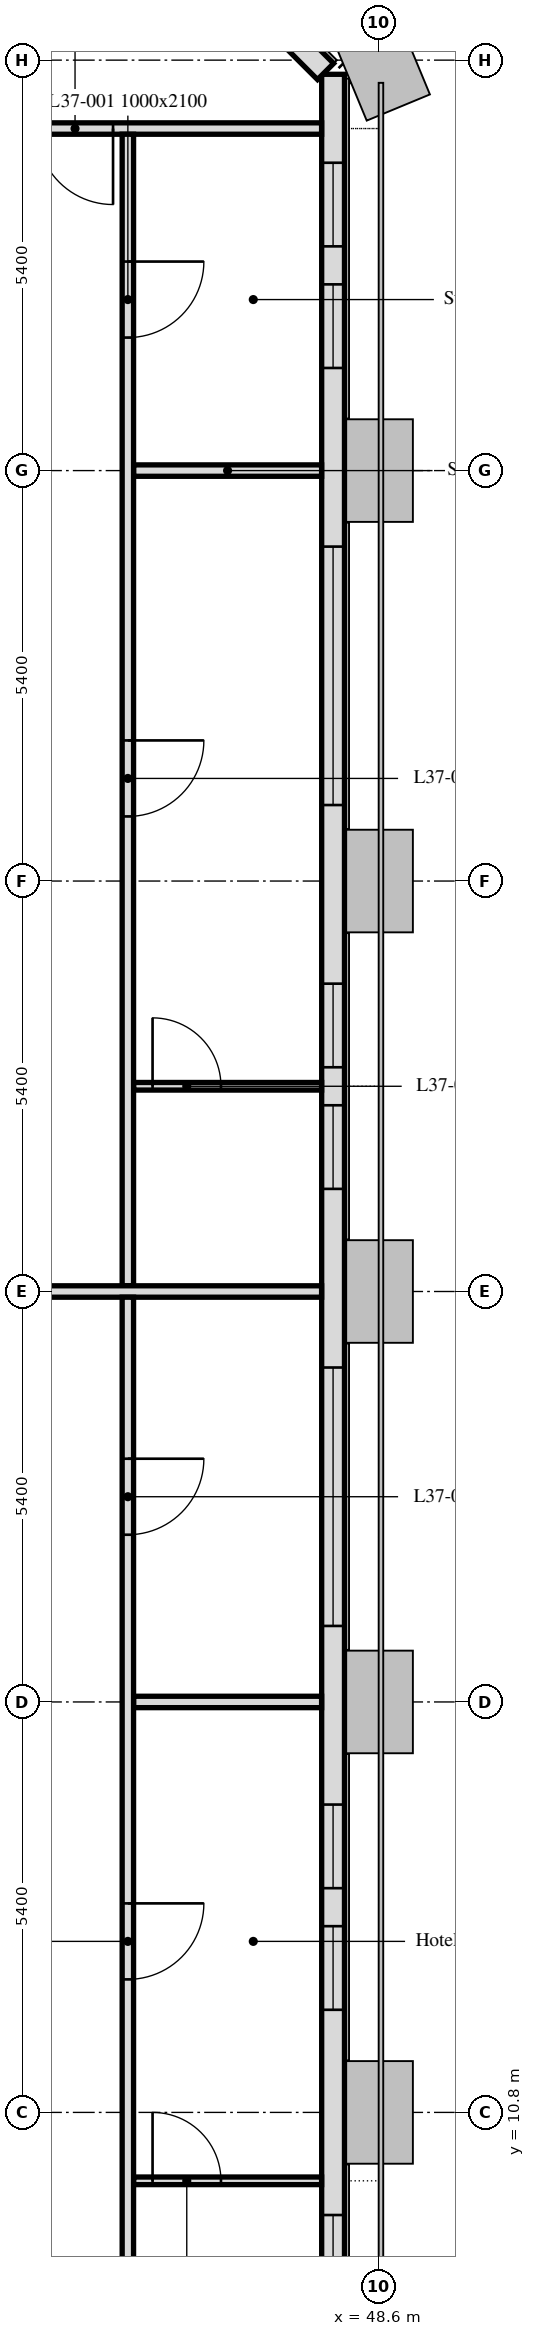
"""IFC4 building model, lengths in metres.
Left out: names, types, materials, properties, quantities, classifications, styles, units other than length and angle.
Written with IfcOpenShell. Run it as: python <this file> out.ifc"""

import sys

from ifc_helpers import new_model, si_unit, direction, frame, frame_2d, origin, place, context, subcontext, project, spatial, rectangle, extrude, element, fill, save


model = new_model("IFC4")
c1 = context("Model", 3, precision=1e-05, world=origin(), true_north=direction((0.0, 1.0)))
c2 = subcontext(c1, "Body", "Model", "MODEL_VIEW")
j1 = project(units=[si_unit("LENGTHUNIT", "METRE"), si_unit("PLANEANGLEUNIT", "RADIAN")], contexts=[c1])
p1 = place(None, origin())
s1 = spatial("IfcSite", under=j1, at=p1, CompositionType="ELEMENT")
p2 = place(p1, origin())
s2 = spatial("IfcBuilding", under=s1, at=p2, CompositionType="ELEMENT")
p3 = place(p2, frame((0.0, 0.0, 159.4)))
s3 = spatial("IfcBuildingStorey", under=s2, at=p3, CompositionType="ELEMENT", Elevation=159.4)
p4 = place(p3, frame((48.0, 5.586, 0.0), z_axis=(0.0, 0.0, 1.0), x_axis=(0.0, 1.0, 0.0)))
e1 = element("IfcWall", 1, at=p4, inside=s3, PredefinedType="SOLIDWALL", context=c2, shape_type="SweptSolid", body=[
    extrude(rectangle(XDim=32.027, YDim=0.3, at=frame_2d((16.014, 0.0))), origin(), (0.0, 0.0, 1.0), 3.0),
])
p5 = place(p4, frame((1.789, 0.0, 0.9)))
e2 = element("IfcOpeningElement", 2, at=p5, cuts=e1, PredefinedType="OPENING", context=c2, shape_type="SweptSolid", body=[
    extrude(rectangle(XDim=0.65, YDim=1.7, at=frame_2d((0.325, 0.85))), frame((0.0, 0.16, 0.0), z_axis=(0.0, -1.0, 0.0), x_axis=(1.0, 0.0, 0.0)), (0.0, 0.0, 1.0), 0.32),
])
p6 = place(p4, frame((2.764, 0.0, 0.9)))
e3 = element("IfcOpeningElement", 3, at=p6, cuts=e1, PredefinedType="OPENING", context=c2, shape_type="SweptSolid", body=[
    extrude(rectangle(XDim=1.1, YDim=1.7, at=frame_2d((0.55, 0.85))), frame((0.0, 0.16, 0.0), z_axis=(0.0, -1.0, 0.0), x_axis=(1.0, 0.0, 0.0)), (0.0, 0.0, 1.0), 0.32),
])
p7 = place(p4, frame((6.564, 0.0, 0.9)))
e4 = element("IfcOpeningElement", 4, at=p7, cuts=e1, PredefinedType="OPENING", context=c2, shape_type="SweptSolid", body=[
    extrude(rectangle(XDim=1.1, YDim=1.7, at=frame_2d((0.55, 0.85))), frame((0.0, 0.16, 0.0), z_axis=(0.0, -1.0, 0.0), x_axis=(1.0, 0.0, 0.0)), (0.0, 0.0, 1.0), 0.32),
])
p8 = place(p4, frame((8.164, 0.0, 0.9)))
e5 = element("IfcOpeningElement", 5, at=p8, cuts=e1, PredefinedType="OPENING", context=c2, shape_type="SweptSolid", body=[
    extrude(rectangle(XDim=1.1, YDim=1.7, at=frame_2d((0.55, 0.85))), frame((0.0, 0.16, 0.0), z_axis=(0.0, -1.0, 0.0), x_axis=(1.0, 0.0, 0.0)), (0.0, 0.0, 1.0), 0.32),
])
p9 = place(p4, frame((11.614, 0.0, 0.9)))
e6 = element("IfcOpeningElement", 6, at=p9, cuts=e1, PredefinedType="OPENING", context=c2, shape_type="SweptSolid", body=[
    extrude(rectangle(XDim=3.4, YDim=1.7, at=frame_2d((1.7, 0.85))), frame((0.0, 0.16, 0.0), z_axis=(0.0, -1.0, 0.0), x_axis=(1.0, 0.0, 0.0)), (0.0, 0.0, 1.0), 0.32),
])
p10 = place(p4, frame((17.364, 0.0, 0.9)))
e7 = element("IfcOpeningElement", 7, at=p10, cuts=e1, PredefinedType="OPENING", context=c2, shape_type="SweptSolid", body=[
    extrude(rectangle(XDim=1.1, YDim=1.7, at=frame_2d((0.55, 0.85))), frame((0.0, 0.16, 0.0), z_axis=(0.0, -1.0, 0.0), x_axis=(1.0, 0.0, 0.0)), (0.0, 0.0, 1.0), 0.32),
])
p11 = place(p4, frame((18.964, 0.0, 0.9)))
e8 = element("IfcOpeningElement", 8, at=p11, cuts=e1, PredefinedType="OPENING", context=c2, shape_type="SweptSolid", body=[
    extrude(rectangle(XDim=1.1, YDim=1.7, at=frame_2d((0.55, 0.85))), frame((0.0, 0.16, 0.0), z_axis=(0.0, -1.0, 0.0), x_axis=(1.0, 0.0, 0.0)), (0.0, 0.0, 1.0), 0.32),
])
p12 = place(p4, frame((22.414, 0.0, 0.9)))
e9 = element("IfcOpeningElement", 9, at=p12, cuts=e1, PredefinedType="OPENING", context=c2, shape_type="SweptSolid", body=[
    extrude(rectangle(XDim=3.4, YDim=1.7, at=frame_2d((1.7, 0.85))), frame((0.0, 0.16, 0.0), z_axis=(0.0, -1.0, 0.0), x_axis=(1.0, 0.0, 0.0)), (0.0, 0.0, 1.0), 0.32),
])
p13 = place(p4, frame((28.164, 0.0, 0.9)))
e10 = element("IfcOpeningElement", 10, at=p13, cuts=e1, PredefinedType="OPENING", context=c2, shape_type="SweptSolid", body=[
    extrude(rectangle(XDim=1.1, YDim=1.7, at=frame_2d((0.55, 0.85))), frame((0.0, 0.16, 0.0), z_axis=(0.0, -1.0, 0.0), x_axis=(1.0, 0.0, 0.0)), (0.0, 0.0, 1.0), 0.32),
])
p14 = place(p4, frame((29.764, 0.0, 0.9)))
e11 = element("IfcOpeningElement", 11, at=p14, cuts=e1, PredefinedType="OPENING", context=c2, shape_type="SweptSolid", body=[
    extrude(rectangle(XDim=1.1, YDim=1.7, at=frame_2d((0.55, 0.85))), frame((0.0, 0.16, 0.0), z_axis=(0.0, -1.0, 0.0), x_axis=(1.0, 0.0, 0.0)), (0.0, 0.0, 1.0), 0.32),
])
p15 = place(p3, frame((47.901, 37.65, 0.0), z_axis=(0.0, 0.0, 1.0), x_axis=(-0.707106781187, 0.707106781187, 0.0)))
e12 = element("IfcWall", 12, at=p15, inside=s3, PredefinedType="SOLIDWALL", context=c2, shape_type="SweptSolid", body=[
    extrude(rectangle(XDim=6.86, YDim=0.3, at=frame_2d((3.43, 0.0))), origin(), (0.0, 0.0, 1.0), 3.0),
])
p16 = place(p15, frame((1.73, 0.0, 0.9)))
e13 = element("IfcOpeningElement", 13, at=p16, cuts=e12, PredefinedType="OPENING", context=c2, shape_type="SweptSolid", body=[
    extrude(rectangle(XDim=3.4, YDim=1.7, at=frame_2d((1.7, 0.85))), frame((0.0, 0.16, 0.0), z_axis=(0.0, -1.0, 0.0), x_axis=(1.0, 0.0, 0.0)), (0.0, 0.0, 1.0), 0.32),
])
p17 = place(p3, frame((45.375, 32.4, 0.0), z_axis=(0.0, 0.0, 1.0), x_axis=(1.0, 0.0, 0.0)))
e14 = element("IfcWall", 14, at=p17, inside=s3, PredefinedType="PARTITIONING", context=c2, shape_type="SweptSolid", body=[
    extrude(rectangle(XDim=2.474, YDim=0.15, at=frame_2d((1.237, 0.0))), origin(), (0.0, 0.0, 1.0), 2.4),
])
p18 = place(p3, frame((47.849, 36.9, 0.0), z_axis=(0.0, 0.0, 1.0), x_axis=(-1.0, 0.0, 0.0)))
e15 = element("IfcWall", 15, at=p18, inside=s3, PredefinedType="PARTITIONING", context=c2, shape_type="SweptSolid", body=[
    extrude(rectangle(XDim=41.698, YDim=0.15, at=frame_2d((20.849, 0.0))), origin(), (0.0, 0.0, 1.0), 3.0),
])
p19 = place(p18, frame((39.249, 0.0, 0.0)))
e16 = element("IfcOpeningElement", 16, at=p19, cuts=e15, PredefinedType="OPENING", context=c2, shape_type="SweptSolid", body=[
    extrude(rectangle(XDim=1.0, YDim=2.1, at=frame_2d((0.5, 1.05))), frame((0.0, 0.075, 0.0), z_axis=(0.0, -1.0, 0.0), x_axis=(1.0, 0.0, 0.0)), (0.0, 0.0, 1.0), 0.15),
])
p20 = place(p18, frame((27.649, 0.0, 0.0)))
e17 = element("IfcOpeningElement", 17, at=p20, cuts=e15, PredefinedType="OPENING", context=c2, shape_type="SweptSolid", body=[
    extrude(rectangle(XDim=1.0, YDim=2.1, at=frame_2d((0.5, 1.05))), frame((0.0, 0.075, 0.0), z_axis=(0.0, -1.0, 0.0), x_axis=(1.0, 0.0, 0.0)), (0.0, 0.0, 1.0), 0.15),
])
p21 = place(p18, frame((22.249, 0.0, 0.0)))
e18 = element("IfcOpeningElement", 18, at=p21, cuts=e15, PredefinedType="OPENING", context=c2, shape_type="SweptSolid", body=[
    extrude(rectangle(XDim=1.0, YDim=2.1, at=frame_2d((0.5, 1.05))), frame((0.0, 0.075, 0.0), z_axis=(0.0, -1.0, 0.0), x_axis=(1.0, 0.0, 0.0)), (0.0, 0.0, 1.0), 0.15),
])
p22 = place(p18, frame((16.849, 0.0, 0.0)))
e19 = element("IfcOpeningElement", 19, at=p22, cuts=e15, PredefinedType="OPENING", context=c2, shape_type="SweptSolid", body=[
    extrude(rectangle(XDim=1.0, YDim=2.1, at=frame_2d((0.5, 1.05))), frame((0.0, 0.075, 0.0), z_axis=(0.0, -1.0, 0.0), x_axis=(1.0, 0.0, 0.0)), (0.0, 0.0, 1.0), 0.15),
])
p23 = place(p18, frame((11.449, 0.0, 0.0)))
e20 = element("IfcOpeningElement", 20, at=p23, cuts=e15, PredefinedType="OPENING", context=c2, shape_type="SweptSolid", body=[
    extrude(rectangle(XDim=1.0, YDim=2.1, at=frame_2d((0.5, 1.05))), frame((0.0, 0.075, 0.0), z_axis=(0.0, -1.0, 0.0), x_axis=(1.0, 0.0, 0.0)), (0.0, 0.0, 1.0), 0.15),
])
p24 = place(p18, frame((2.744, 0.0, 0.0)))
e21 = element("IfcOpeningElement", 21, at=p24, cuts=e15, PredefinedType="OPENING", context=c2, shape_type="SweptSolid", body=[
    extrude(rectangle(XDim=1.0, YDim=2.1, at=frame_2d((0.5, 1.05))), frame((0.0, 0.075, 0.0), z_axis=(0.0, -1.0, 0.0), x_axis=(1.0, 0.0, 0.0)), (0.0, 0.0, 1.0), 0.15),
])
p25 = place(p3, frame((45.375, 24.3, 0.0), z_axis=(0.0, 0.0, 1.0), x_axis=(1.0, 0.0, 0.0)))
e22 = element("IfcWall", 22, at=p25, inside=s3, PredefinedType="PARTITIONING", context=c2, shape_type="SweptSolid", body=[
    extrude(rectangle(XDim=2.474, YDim=0.1, at=frame_2d((1.237, 0.0))), origin(), (0.0, 0.0, 1.0), 3.0),
])
p26 = place(p25, frame((0.25, 0.0, 0.0)))
e23 = element("IfcOpeningElement", 23, at=p26, cuts=e22, PredefinedType="OPENING", context=c2, shape_type="SweptSolid", body=[
    extrude(rectangle(XDim=0.9, YDim=2.1, at=frame_2d((0.45, 1.05))), frame((0.0, 0.05, 0.0), z_axis=(0.0, -1.0, 0.0), x_axis=(1.0, 0.0, 0.0)), (0.0, 0.0, 1.0), 0.1),
])
p27 = place(p3, frame((45.3, 36.825, 0.0), z_axis=(0.0, 0.0, 1.0), x_axis=(0.0, -1.0, 0.0)))
e24 = element("IfcWall", 24, at=p27, inside=s3, PredefinedType="PARTITIONING", context=c2, shape_type="SweptSolid", body=[
    extrude(rectangle(XDim=15.15, YDim=0.15, at=frame_2d((7.575, 0.0))), origin(), (0.0, 0.0, 1.0), 2.4),
])
p28 = place(p27, frame((1.675, 0.0, 0.0)))
e25 = element("IfcOpeningElement", 25, at=p28, cuts=e24, PredefinedType="OPENING", context=c2, shape_type="SweptSolid", body=[
    extrude(rectangle(XDim=1.0, YDim=2.1, at=frame_2d((0.5, 1.05))), frame((0.0, 0.075, 0.0), z_axis=(0.0, -1.0, 0.0), x_axis=(1.0, 0.0, 0.0)), (0.0, 0.0, 1.0), 0.15),
])
p29 = place(p27, frame((7.975, 0.0, 0.0)))
e26 = element("IfcOpeningElement", 26, at=p29, cuts=e24, PredefinedType="OPENING", context=c2, shape_type="SweptSolid", body=[
    extrude(rectangle(XDim=1.0, YDim=2.1, at=frame_2d((0.5, 1.05))), frame((0.0, 0.075, 0.0), z_axis=(0.0, -1.0, 0.0), x_axis=(1.0, 0.0, 0.0)), (0.0, 0.0, 1.0), 0.15),
])
p30 = place(p3, frame((43.2, 21.6, 0.0), z_axis=(0.0, 0.0, 1.0), x_axis=(1.0, 0.0, 0.0)))
e27 = element("IfcWall", 27, at=p30, inside=s3, PredefinedType="PARTITIONING", context=c2, shape_type="SweptSolid", body=[
    extrude(rectangle(XDim=4.649, YDim=0.15, at=frame_2d((2.325, 0.0))), origin(), (0.0, 0.0, 1.0), 2.4),
])
p31 = place(p3, frame((47.849, 16.2, 0.0), z_axis=(0.0, 0.0, 1.0), x_axis=(-1.0, 0.0, 0.0)))
e28 = element("IfcWall", 28, at=p31, inside=s3, PredefinedType="PARTITIONING", context=c2, shape_type="SweptSolid", body=[
    extrude(rectangle(XDim=2.474, YDim=0.15, at=frame_2d((1.237, 0.0))), origin(), (0.0, 0.0, 1.0), 2.4),
])
p32 = place(p3, frame((45.375, 9.9, 0.0), z_axis=(0.0, 0.0, 1.0), x_axis=(1.0, 0.0, 0.0)))
e29 = element("IfcWall", 29, at=p32, inside=s3, PredefinedType="PARTITIONING", context=c2, shape_type="SweptSolid", body=[
    extrude(rectangle(XDim=2.474, YDim=0.1, at=frame_2d((1.237, 0.0))), origin(), (0.0, 0.0, 1.0), 3.0),
])
p33 = place(p32, frame((0.25, 0.0, 0.0)))
e30 = element("IfcOpeningElement", 30, at=p33, cuts=e29, PredefinedType="OPENING", context=c2, shape_type="SweptSolid", body=[
    extrude(rectangle(XDim=0.9, YDim=2.1, at=frame_2d((0.45, 1.05))), frame((0.0, 0.05, 0.0), z_axis=(0.0, -1.0, 0.0), x_axis=(1.0, 0.0, 0.0)), (0.0, 0.0, 1.0), 0.1),
])
p34 = place(p3, frame((45.3, 21.525, 0.0), z_axis=(0.0, 0.0, 1.0), x_axis=(0.0, -1.0, 0.0)))
e31 = element("IfcWall", 31, at=p34, inside=s3, PredefinedType="PARTITIONING", context=c2, shape_type="SweptSolid", body=[
    extrude(rectangle(XDim=14.25, YDim=0.15, at=frame_2d((7.125, 0.0))), origin(), (0.0, 0.0, 1.0), 2.4),
])
p35 = place(p34, frame((2.125, 0.0, 0.0)))
e32 = element("IfcOpeningElement", 32, at=p35, cuts=e31, PredefinedType="OPENING", context=c2, shape_type="SweptSolid", body=[
    extrude(rectangle(XDim=1.0, YDim=2.1, at=frame_2d((0.5, 1.05))), frame((0.0, 0.075, 0.0), z_axis=(0.0, -1.0, 0.0), x_axis=(1.0, 0.0, 0.0)), (0.0, 0.0, 1.0), 0.15),
])
p36 = place(p34, frame((7.975, 0.0, 0.0)))
e33 = element("IfcOpeningElement", 33, at=p36, cuts=e31, PredefinedType="OPENING", context=c2, shape_type="SweptSolid", body=[
    extrude(rectangle(XDim=1.0, YDim=2.1, at=frame_2d((0.5, 1.05))), frame((0.0, 0.075, 0.0), z_axis=(0.0, -1.0, 0.0), x_axis=(1.0, 0.0, 0.0)), (0.0, 0.0, 1.0), 0.15),
])
p37 = place(p6, origin())
e34 = element("IfcWindow", 34, at=p37, inside=s3, PartitioningType="SINGLE_PANEL", PredefinedType="WINDOW", context=c2, shape_type="SweptSolid", body=[
    extrude(rectangle(XDim=1.1, YDim=1.7, at=frame_2d((0.55, 0.85))), frame((0.0, 0.03, 0.0), z_axis=(0.0, -1.0, 0.0), x_axis=(1.0, 0.0, 0.0)), (0.0, 0.0, 1.0), 0.06),
])
fill(e3, e34)
p38 = place(p7, origin())
e35 = element("IfcWindow", 35, at=p38, inside=s3, PartitioningType="SINGLE_PANEL", PredefinedType="WINDOW", context=c2, shape_type="SweptSolid", body=[
    extrude(rectangle(XDim=1.1, YDim=1.7, at=frame_2d((0.55, 0.85))), frame((0.0, 0.03, 0.0), z_axis=(0.0, -1.0, 0.0), x_axis=(1.0, 0.0, 0.0)), (0.0, 0.0, 1.0), 0.06),
])
fill(e4, e35)
p39 = place(p8, origin())
e36 = element("IfcWindow", 36, at=p39, inside=s3, PartitioningType="SINGLE_PANEL", PredefinedType="WINDOW", context=c2, shape_type="SweptSolid", body=[
    extrude(rectangle(XDim=1.1, YDim=1.7, at=frame_2d((0.55, 0.85))), frame((0.0, 0.03, 0.0), z_axis=(0.0, -1.0, 0.0), x_axis=(1.0, 0.0, 0.0)), (0.0, 0.0, 1.0), 0.06),
])
fill(e5, e36)
p40 = place(p9, origin())
e37 = element("IfcWindow", 37, at=p40, inside=s3, PartitioningType="SINGLE_PANEL", PredefinedType="WINDOW", context=c2, shape_type="SweptSolid", body=[
    extrude(rectangle(XDim=3.4, YDim=1.7, at=frame_2d((1.7, 0.85))), frame((0.0, 0.03, 0.0), z_axis=(0.0, -1.0, 0.0), x_axis=(1.0, 0.0, 0.0)), (0.0, 0.0, 1.0), 0.06),
])
fill(e6, e37)
p41 = place(p10, origin())
e38 = element("IfcWindow", 38, at=p41, inside=s3, PartitioningType="SINGLE_PANEL", PredefinedType="WINDOW", context=c2, shape_type="SweptSolid", body=[
    extrude(rectangle(XDim=1.1, YDim=1.7, at=frame_2d((0.55, 0.85))), frame((0.0, 0.03, 0.0), z_axis=(0.0, -1.0, 0.0), x_axis=(1.0, 0.0, 0.0)), (0.0, 0.0, 1.0), 0.06),
])
fill(e7, e38)
p42 = place(p11, origin())
e39 = element("IfcWindow", 39, at=p42, inside=s3, PartitioningType="SINGLE_PANEL", PredefinedType="WINDOW", context=c2, shape_type="SweptSolid", body=[
    extrude(rectangle(XDim=1.1, YDim=1.7, at=frame_2d((0.55, 0.85))), frame((0.0, 0.03, 0.0), z_axis=(0.0, -1.0, 0.0), x_axis=(1.0, 0.0, 0.0)), (0.0, 0.0, 1.0), 0.06),
])
fill(e8, e39)
p43 = place(p12, origin())
e40 = element("IfcWindow", 40, at=p43, inside=s3, PartitioningType="SINGLE_PANEL", PredefinedType="WINDOW", context=c2, shape_type="SweptSolid", body=[
    extrude(rectangle(XDim=3.4, YDim=1.7, at=frame_2d((1.7, 0.85))), frame((0.0, 0.03, 0.0), z_axis=(0.0, -1.0, 0.0), x_axis=(1.0, 0.0, 0.0)), (0.0, 0.0, 1.0), 0.06),
])
fill(e9, e40)
p44 = place(p13, origin())
e41 = element("IfcWindow", 41, at=p44, inside=s3, PartitioningType="SINGLE_PANEL", PredefinedType="WINDOW", context=c2, shape_type="SweptSolid", body=[
    extrude(rectangle(XDim=1.1, YDim=1.7, at=frame_2d((0.55, 0.85))), frame((0.0, 0.03, 0.0), z_axis=(0.0, -1.0, 0.0), x_axis=(1.0, 0.0, 0.0)), (0.0, 0.0, 1.0), 0.06),
])
fill(e10, e41)
p45 = place(p14, origin())
e42 = element("IfcWindow", 42, at=p45, inside=s3, PartitioningType="SINGLE_PANEL", PredefinedType="WINDOW", context=c2, shape_type="SweptSolid", body=[
    extrude(rectangle(XDim=1.1, YDim=1.7, at=frame_2d((0.55, 0.85))), frame((0.0, 0.03, 0.0), z_axis=(0.0, -1.0, 0.0), x_axis=(1.0, 0.0, 0.0)), (0.0, 0.0, 1.0), 0.06),
])
fill(e11, e42)
p46 = place(p28, origin())
e43 = element("IfcDoor", 43, at=p46, inside=s3, OperationType="SINGLE_SWING_LEFT", PredefinedType="DOOR", context=c2, shape_type="SweptSolid", body=[
    extrude(rectangle(XDim=1.0, YDim=2.1, at=frame_2d((0.5, 1.05))), frame((0.0, 0.025, 0.0), z_axis=(0.0, -1.0, 0.0), x_axis=(1.0, 0.0, 0.0)), (0.0, 0.0, 1.0), 0.05),
])
fill(e25, e43)
p47 = place(p26, origin())
e44 = element("IfcDoor", 44, at=p47, inside=s3, OperationType="SINGLE_SWING_LEFT", PredefinedType="DOOR", context=c2, shape_type="SweptSolid", body=[
    extrude(rectangle(XDim=0.9, YDim=2.1, at=frame_2d((0.45, 1.05))), frame((0.0, 0.025, 0.0), z_axis=(0.0, -1.0, 0.0), x_axis=(1.0, 0.0, 0.0)), (0.0, 0.0, 1.0), 0.05),
])
fill(e23, e44)
p48 = place(p33, origin())
e45 = element("IfcDoor", 45, at=p48, inside=s3, OperationType="SINGLE_SWING_RIGHT", PredefinedType="DOOR", context=c2, shape_type="SweptSolid", body=[
    extrude(rectangle(XDim=0.9, YDim=2.1, at=frame_2d((0.45, 1.05))), frame((0.0, 0.025, 0.0), z_axis=(0.0, -1.0, 0.0), x_axis=(1.0, 0.0, 0.0)), (0.0, 0.0, 1.0), 0.05),
])
fill(e30, e45)
p49 = place(p35, origin())
e46 = element("IfcDoor", 46, at=p49, inside=s3, OperationType="SINGLE_SWING_RIGHT", PredefinedType="DOOR", context=c2, shape_type="SweptSolid", body=[
    extrude(rectangle(XDim=1.0, YDim=2.1, at=frame_2d((0.5, 1.05))), frame((0.0, 0.025, 0.0), z_axis=(0.0, -1.0, 0.0), x_axis=(1.0, 0.0, 0.0)), (0.0, 0.0, 1.0), 0.05),
])
fill(e32, e46)
p50 = place(p24, origin())
e47 = element("IfcDoor", 47, at=p50, inside=s3, OperationType="SINGLE_SWING_LEFT", PredefinedType="DOOR", context=c2, shape_type="SweptSolid", body=[
    extrude(rectangle(XDim=1.0, YDim=2.1, at=frame_2d((0.5, 1.05))), frame((0.0, 0.025, 0.0), z_axis=(0.0, -1.0, 0.0), x_axis=(1.0, 0.0, 0.0)), (0.0, 0.0, 1.0), 0.05),
])
fill(e21, e47)
p51 = place(p29, origin())
e48 = element("IfcDoor", 48, at=p51, inside=s3, OperationType="SINGLE_SWING_RIGHT", PredefinedType="DOOR", context=c2, shape_type="SweptSolid", body=[
    extrude(rectangle(XDim=1.0, YDim=2.1, at=frame_2d((0.5, 1.05))), frame((0.0, 0.025, 0.0), z_axis=(0.0, -1.0, 0.0), x_axis=(1.0, 0.0, 0.0)), (0.0, 0.0, 1.0), 0.05),
])
fill(e26, e48)
p52 = place(p36, origin())
e49 = element("IfcDoor", 49, at=p52, inside=s3, OperationType="SINGLE_SWING_RIGHT", PredefinedType="DOOR", context=c2, shape_type="SweptSolid", body=[
    extrude(rectangle(XDim=1.0, YDim=2.1, at=frame_2d((0.5, 1.05))), frame((0.0, 0.025, 0.0), z_axis=(0.0, -1.0, 0.0), x_axis=(1.0, 0.0, 0.0)), (0.0, 0.0, 1.0), 0.05),
])
fill(e33, e49)
save(model, sys.argv[1])
